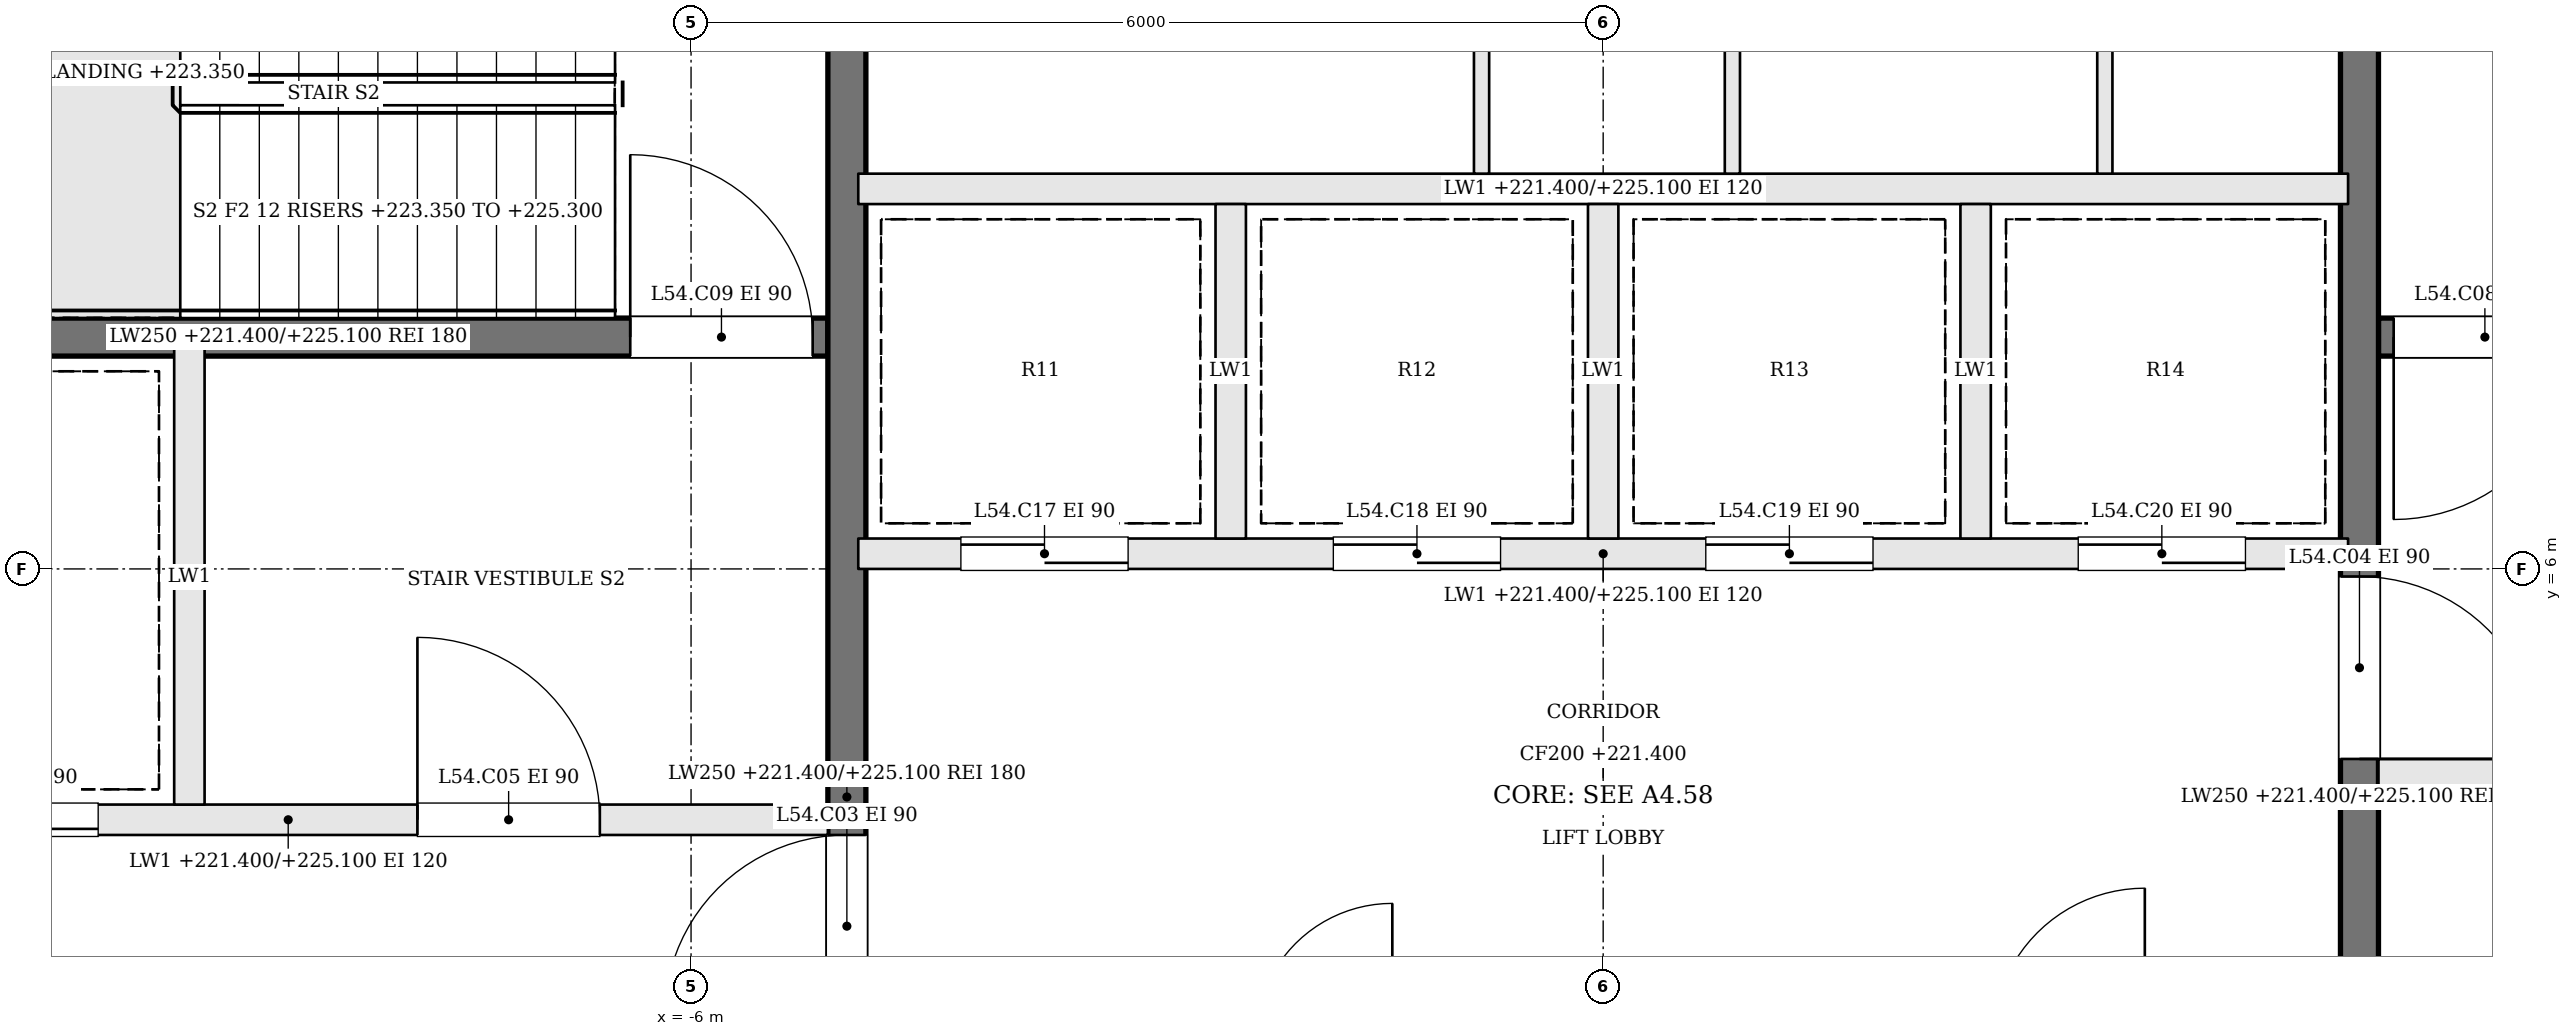
"""IFC4 building model, lengths in metres.
Left out: names, types, materials, properties, quantities, classifications, styles, units other than length and angle.
Written with IfcOpenShell. Run it as: python <this file> out.ifc"""

import sys

from ifc_helpers import new_model, si_unit, direction, frame, frame_2d, origin, place, context, subcontext, project, spatial, rectangle, extrude, element, fill, save


model = new_model("IFC4")
c1 = context("Model", 3, precision=1e-05, world=origin(), true_north=direction((0.0, 1.0)))
c2 = subcontext(c1, "Body", "Model", "MODEL_VIEW")
j1 = project(units=[si_unit("LENGTHUNIT", "METRE"), si_unit("PLANEANGLEUNIT", "RADIAN")], contexts=[c1])
p1 = place(None, origin())
s1 = spatial("IfcSite", under=j1, at=p1, CompositionType="ELEMENT")
p2 = place(p1, origin())
s2 = spatial("IfcBuilding", under=s1, at=p2, CompositionType="ELEMENT")
p3 = place(p2, frame((0.0, 0.0, 221.4)))
s3 = spatial("IfcBuildingStorey", under=s2, at=p3, CompositionType="ELEMENT", Elevation=221.4)
p4 = place(p3, frame((12.2, 7.525, 0.0), z_axis=(0.0, 0.0, 1.0), x_axis=(-1.0, 0.0, 0.0)))
e1 = element("IfcWall", 1, at=p4, inside=s3, PredefinedType="SOLIDWALL", context=c2, shape_type="SweptSolid", body=[
    extrude(rectangle(XDim=7.1, YDim=0.25, at=frame_2d((3.55, 0.0))), origin(), (0.0, 0.0, 1.0), 3.7),
])
p5 = place(p4, frame((5.8, 0.0, 0.0)))
e2 = element("IfcOpeningElement", 2, at=p5, cuts=e1, PredefinedType="OPENING", context=c2, shape_type="SweptSolid", body=[
    extrude(rectangle(XDim=1.2, YDim=2.1, at=frame_2d((0.6, 1.05))), frame((0.0, 0.135, 0.0), z_axis=(0.0, -1.0, 0.0), x_axis=(1.0, 0.0, 0.0)), (0.0, 0.0, 1.0), 0.27),
])
p6 = place(p3, frame((-12.2, 4.35, 0.0), z_axis=(0.0, 0.0, 1.0), x_axis=(1.0, 0.0, 0.0)))
e3 = element("IfcWall", 3, at=p6, inside=s3, PredefinedType="SOLIDWALL", context=c2, shape_type="SweptSolid", body=[
    extrude(rectangle(XDim=7.1, YDim=0.2, at=frame_2d((3.55, 0.0))), origin(), (0.0, 0.0, 1.0), 3.7),
])
p7 = place(p6, frame((4.4, 0.0, 0.0)))
e4 = element("IfcOpeningElement", 4, at=p7, cuts=e3, PredefinedType="OPENING", context=c2, shape_type="SweptSolid", body=[
    extrude(rectangle(XDim=1.2, YDim=2.1, at=frame_2d((0.6, 1.05))), frame((0.0, 0.11, 0.0), z_axis=(0.0, -1.0, 0.0), x_axis=(1.0, 0.0, 0.0)), (0.0, 0.0, 1.0), 0.22),
])
p8 = place(p6, frame((1.1, 0.0, 0.0)))
e5 = element("IfcOpeningElement", 5, at=p8, cuts=e3, PredefinedType="OPENING", context=c2, shape_type="SweptSolid", body=[
    extrude(rectangle(XDim=1.2, YDim=2.1, at=frame_2d((0.6, 1.05))), frame((0.0, 0.11, 0.0), z_axis=(0.0, -1.0, 0.0), x_axis=(1.0, 0.0, 0.0)), (0.0, 0.0, 1.0), 0.22),
])
p9 = place(p3, frame((12.2, 4.65, 0.0), z_axis=(0.0, 0.0, 1.0), x_axis=(-1.0, 0.0, 0.0)))
e6 = element("IfcWall", 6, at=p9, inside=s3, PredefinedType="SOLIDWALL", context=c2, shape_type="SweptSolid", body=[
    extrude(rectangle(XDim=7.1, YDim=0.2, at=frame_2d((3.55, 0.0))), origin(), (0.0, 0.0, 1.0), 3.7),
])
p10 = place(p9, frame((4.4, 0.0, 0.0)))
e7 = element("IfcOpeningElement", 7, at=p10, cuts=e6, PredefinedType="OPENING", context=c2, shape_type="SweptSolid", body=[
    extrude(rectangle(XDim=1.2, YDim=2.1, at=frame_2d((0.6, 1.05))), frame((0.0, 0.11, 0.0), z_axis=(0.0, -1.0, 0.0), x_axis=(1.0, 0.0, 0.0)), (0.0, 0.0, 1.0), 0.22),
])
p11 = place(p9, frame((1.1, 0.0, 0.0)))
e8 = element("IfcOpeningElement", 8, at=p11, cuts=e6, PredefinedType="OPENING", context=c2, shape_type="SweptSolid", body=[
    extrude(rectangle(XDim=1.2, YDim=2.1, at=frame_2d((0.6, 1.05))), frame((0.0, 0.11, 0.0), z_axis=(0.0, -1.0, 0.0), x_axis=(1.0, 0.0, 0.0)), (0.0, 0.0, 1.0), 0.22),
])
p12 = place(p3, frame((-12.2, 7.525, 0.0), z_axis=(0.0, 0.0, 1.0), x_axis=(1.0, 0.0, 0.0)))
e9 = element("IfcWall", 9, at=p12, inside=s3, PredefinedType="SOLIDWALL", context=c2, shape_type="SweptSolid", body=[
    extrude(rectangle(XDim=7.1, YDim=0.25, at=frame_2d((3.55, 0.0))), origin(), (0.0, 0.0, 1.0), 3.7),
])
p13 = place(p12, frame((5.8, 0.0, 0.0)))
e10 = element("IfcOpeningElement", 10, at=p13, cuts=e9, PredefinedType="OPENING", context=c2, shape_type="SweptSolid", body=[
    extrude(rectangle(XDim=1.2, YDim=2.1, at=frame_2d((0.6, 1.05))), frame((0.0, 0.135, 0.0), z_axis=(0.0, -1.0, 0.0), x_axis=(1.0, 0.0, 0.0)), (0.0, 0.0, 1.0), 0.27),
])
p14 = place(p3, frame((-9.3, 4.45, 0.0), z_axis=(0.0, 0.0, 1.0), x_axis=(0.0, 1.0, 0.0)))
e11 = element("IfcWall", 11, at=p14, inside=s3, PredefinedType="SOLIDWALL", context=c2, shape_type="SweptSolid", body=[
    extrude(rectangle(XDim=3.0, YDim=0.2, at=frame_2d((1.5, 0.0))), origin(), (0.0, 0.0, 1.0), 3.7),
])
p15 = place(p3, frame((-4.975, -2.2, 0.0), z_axis=(0.0, 0.0, 1.0), x_axis=(0.0, 1.0, 0.0)))
e12 = element("IfcWall", 12, at=p15, inside=s3, PredefinedType="SOLIDWALL", context=c2, shape_type="SweptSolid", body=[
    extrude(rectangle(XDim=13.4, YDim=0.25, at=frame_2d((6.7, 0.0))), origin(), (0.0, 0.0, 1.0), 3.7),
])
p16 = place(p15, frame((5.25, 0.0, 0.0)))
e13 = element("IfcOpeningElement", 13, at=p16, cuts=e12, PredefinedType="OPENING", context=c2, shape_type="SweptSolid", body=[
    extrude(rectangle(XDim=1.2, YDim=2.1, at=frame_2d((0.6, 1.05))), frame((0.0, 0.135, 0.0), z_axis=(0.0, -1.0, 0.0), x_axis=(1.0, 0.0, 0.0)), (0.0, 0.0, 1.0), 0.27),
])
p17 = place(p3, frame((4.975, 11.2, 0.0), z_axis=(0.0, 0.0, 1.0), x_axis=(0.0, -1.0, 0.0)))
e14 = element("IfcWall", 14, at=p17, inside=s3, PredefinedType="SOLIDWALL", context=c2, shape_type="SweptSolid", body=[
    extrude(rectangle(XDim=13.4, YDim=0.25, at=frame_2d((6.7, 0.0))), origin(), (0.0, 0.0, 1.0), 3.7),
])
p18 = place(p17, frame((5.25, 0.0, 0.0)))
e15 = element("IfcOpeningElement", 15, at=p18, cuts=e14, PredefinedType="OPENING", context=c2, shape_type="SweptSolid", body=[
    extrude(rectangle(XDim=1.2, YDim=2.1, at=frame_2d((0.6, 1.05))), frame((0.0, 0.135, 0.0), z_axis=(0.0, -1.0, 0.0), x_axis=(1.0, 0.0, 0.0)), (0.0, 0.0, 1.0), 0.27),
])
p19 = place(p3, frame((-4.9, 6.1, 0.0), z_axis=(0.0, 0.0, 1.0), x_axis=(1.0, 0.0, 0.0)))
e16 = element("IfcWall", 16, at=p19, inside=s3, PredefinedType="SOLIDWALL", context=c2, shape_type="SweptSolid", body=[
    extrude(rectangle(XDim=9.8, YDim=0.2, at=frame_2d((4.9, 0.0))), origin(), (0.0, 0.0, 1.0), 3.7),
])
p20 = place(p19, frame((0.675, 0.0, 0.0)))
e17 = element("IfcOpeningElement", 17, at=p20, cuts=e16, PredefinedType="OPENING", context=c2, shape_type="SweptSolid", body=[
    extrude(rectangle(XDim=1.1, YDim=2.1, at=frame_2d((0.55, 1.05))), frame((0.0, 0.11, 0.0), z_axis=(0.0, -1.0, 0.0), x_axis=(1.0, 0.0, 0.0)), (0.0, 0.0, 1.0), 0.22),
])
p21 = place(p19, frame((3.125, 0.0, 0.0)))
e18 = element("IfcOpeningElement", 18, at=p21, cuts=e16, PredefinedType="OPENING", context=c2, shape_type="SweptSolid", body=[
    extrude(rectangle(XDim=1.1, YDim=2.1, at=frame_2d((0.55, 1.05))), frame((0.0, 0.11, 0.0), z_axis=(0.0, -1.0, 0.0), x_axis=(1.0, 0.0, 0.0)), (0.0, 0.0, 1.0), 0.22),
])
p22 = place(p19, frame((5.575, 0.0, 0.0)))
e19 = element("IfcOpeningElement", 19, at=p22, cuts=e16, PredefinedType="OPENING", context=c2, shape_type="SweptSolid", body=[
    extrude(rectangle(XDim=1.1, YDim=2.1, at=frame_2d((0.55, 1.05))), frame((0.0, 0.11, 0.0), z_axis=(0.0, -1.0, 0.0), x_axis=(1.0, 0.0, 0.0)), (0.0, 0.0, 1.0), 0.22),
])
p23 = place(p19, frame((8.025, 0.0, 0.0)))
e20 = element("IfcOpeningElement", 20, at=p23, cuts=e16, PredefinedType="OPENING", context=c2, shape_type="SweptSolid", body=[
    extrude(rectangle(XDim=1.1, YDim=2.1, at=frame_2d((0.55, 1.05))), frame((0.0, 0.11, 0.0), z_axis=(0.0, -1.0, 0.0), x_axis=(1.0, 0.0, 0.0)), (0.0, 0.0, 1.0), 0.22),
])
p24 = place(p3, frame((-4.9, 8.5, 0.0), z_axis=(0.0, 0.0, 1.0), x_axis=(1.0, 0.0, 0.0)))
e21 = element("IfcWall", 21, at=p24, inside=s3, PredefinedType="SOLIDWALL", context=c2, shape_type="SweptSolid", body=[
    extrude(rectangle(XDim=9.8, YDim=0.2, at=frame_2d((4.9, 0.0))), origin(), (0.0, 0.0, 1.0), 3.7),
])
for number, where, z_axis, x_axis in (
    (22, (-2.45, 6.2, 0.0), (0.0, 0.0, 1.0), (0.0, 1.0, 0.0)),
    (23, (0.0, 6.2, 0.0), (0.0, 0.0, 1.0), (0.0, 1.0, 0.0)),
    (24, (2.45, 6.2, 0.0), (0.0, 0.0, 1.0), (0.0, 1.0, 0.0)),
):
    element("IfcWall", number, at=place(p3, frame(where, z_axis=z_axis, x_axis=x_axis)), inside=s3, PredefinedType="SOLIDWALL", context=c2, shape_type="SweptSolid", body=[
        extrude(rectangle(XDim=2.2, YDim=0.2, at=frame_2d((1.1, 0.0))), origin(), (0.0, 0.0, 1.0), 3.7),
    ])
for number, where, z_axis, x_axis in (
    (25, (-0.8, 8.6, 0.0), (0.0, 0.0, 1.0), (0.0, 1.0, 0.0)),
    (26, (0.85, 8.6, 0.0), (0.0, 0.0, 1.0), (0.0, 1.0, 0.0)),
    (27, (3.3, 8.6, 0.0), (0.0, 0.0, 1.0), (0.0, 1.0, 0.0)),
):
    element("IfcWall", number, at=place(p3, frame(where, z_axis=z_axis, x_axis=x_axis)), inside=s3, PredefinedType="PARTITIONING", context=c2, shape_type="SweptSolid", body=[
        extrude(rectangle(XDim=2.6, YDim=0.1, at=frame_2d((1.3, 0.0))), origin(), (0.0, 0.0, 1.0), 3.7),
    ])
p25 = place(p16, origin())
e28 = element("IfcDoor", 28, at=p25, inside=s3, OperationType="SINGLE_SWING_LEFT", PredefinedType="DOOR", context=c2, shape_type="SweptSolid", body=[
    extrude(rectangle(XDim=1.2, YDim=2.1, at=frame_2d((0.6, 1.05))), frame((0.0, 0.025, 0.0), z_axis=(0.0, -1.0, 0.0), x_axis=(1.0, 0.0, 0.0)), (0.0, 0.0, 1.0), 0.05),
])
fill(e13, e28)
p26 = place(p18, origin())
e29 = element("IfcDoor", 29, at=p26, inside=s3, OperationType="SINGLE_SWING_RIGHT", PredefinedType="DOOR", context=c2, shape_type="SweptSolid", body=[
    extrude(rectangle(XDim=1.2, YDim=2.1, at=frame_2d((0.6, 1.05))), frame((0.0, 0.025, 0.0), z_axis=(0.0, -1.0, 0.0), x_axis=(1.0, 0.0, 0.0)), (0.0, 0.0, 1.0), 0.05),
])
fill(e15, e29)
p27 = place(p7, origin())
e30 = element("IfcDoor", 30, at=p27, inside=s3, OperationType="SINGLE_SWING_LEFT", PredefinedType="DOOR", context=c2, shape_type="SweptSolid", body=[
    extrude(rectangle(XDim=1.2, YDim=2.1, at=frame_2d((0.6, 1.05))), frame((0.0, 0.025, 0.0), z_axis=(0.0, -1.0, 0.0), x_axis=(1.0, 0.0, 0.0)), (0.0, 0.0, 1.0), 0.05),
])
fill(e4, e30)
p28 = place(p5, origin())
e31 = element("IfcDoor", 31, at=p28, inside=s3, OperationType="SINGLE_SWING_RIGHT", PredefinedType="DOOR", context=c2, shape_type="SweptSolid", body=[
    extrude(rectangle(XDim=1.2, YDim=2.1, at=frame_2d((0.6, 1.05))), frame((0.0, 0.025, 0.0), z_axis=(0.0, -1.0, 0.0), x_axis=(1.0, 0.0, 0.0)), (0.0, 0.0, 1.0), 0.05),
])
fill(e2, e31)
p29 = place(p13, origin())
e32 = element("IfcDoor", 32, at=p29, inside=s3, OperationType="SINGLE_SWING_LEFT", PredefinedType="DOOR", context=c2, shape_type="SweptSolid", body=[
    extrude(rectangle(XDim=1.2, YDim=2.1, at=frame_2d((0.6, 1.05))), frame((0.0, 0.025, 0.0), z_axis=(0.0, -1.0, 0.0), x_axis=(1.0, 0.0, 0.0)), (0.0, 0.0, 1.0), 0.05),
])
fill(e10, e32)
p30 = place(p8, origin())
e33 = element("IfcDoor", 33, at=p30, inside=s3, OperationType="SLIDING_TO_RIGHT", PredefinedType="DOOR", context=c2, shape_type="SweptSolid", body=[
    extrude(rectangle(XDim=1.2, YDim=2.1, at=frame_2d((0.6, 1.05))), frame((0.0, 0.025, 0.0), z_axis=(0.0, -1.0, 0.0), x_axis=(1.0, 0.0, 0.0)), (0.0, 0.0, 1.0), 0.05),
])
fill(e5, e33)
p31 = place(p20, origin())
e34 = element("IfcDoor", 34, at=p31, inside=s3, OperationType="SLIDING_TO_RIGHT", PredefinedType="DOOR", context=c2, shape_type="SweptSolid", body=[
    extrude(rectangle(XDim=1.1, YDim=2.1, at=frame_2d((0.55, 1.05))), frame((0.0, 0.025, 0.0), z_axis=(0.0, -1.0, 0.0), x_axis=(1.0, 0.0, 0.0)), (0.0, 0.0, 1.0), 0.05),
])
fill(e17, e34)
p32 = place(p21, origin())
e35 = element("IfcDoor", 35, at=p32, inside=s3, OperationType="SLIDING_TO_LEFT", PredefinedType="DOOR", context=c2, shape_type="SweptSolid", body=[
    extrude(rectangle(XDim=1.1, YDim=2.1, at=frame_2d((0.55, 1.05))), frame((0.0, 0.025, 0.0), z_axis=(0.0, -1.0, 0.0), x_axis=(1.0, 0.0, 0.0)), (0.0, 0.0, 1.0), 0.05),
])
fill(e18, e35)
p33 = place(p22, origin())
e36 = element("IfcDoor", 36, at=p33, inside=s3, OperationType="SLIDING_TO_RIGHT", PredefinedType="DOOR", context=c2, shape_type="SweptSolid", body=[
    extrude(rectangle(XDim=1.1, YDim=2.1, at=frame_2d((0.55, 1.05))), frame((0.0, 0.025, 0.0), z_axis=(0.0, -1.0, 0.0), x_axis=(1.0, 0.0, 0.0)), (0.0, 0.0, 1.0), 0.05),
])
fill(e19, e36)
p34 = place(p23, origin())
e37 = element("IfcDoor", 37, at=p34, inside=s3, OperationType="SLIDING_TO_LEFT", PredefinedType="DOOR", context=c2, shape_type="SweptSolid", body=[
    extrude(rectangle(XDim=1.1, YDim=2.1, at=frame_2d((0.55, 1.05))), frame((0.0, 0.025, 0.0), z_axis=(0.0, -1.0, 0.0), x_axis=(1.0, 0.0, 0.0)), (0.0, 0.0, 1.0), 0.05),
])
fill(e20, e37)
save(model, sys.argv[1])
